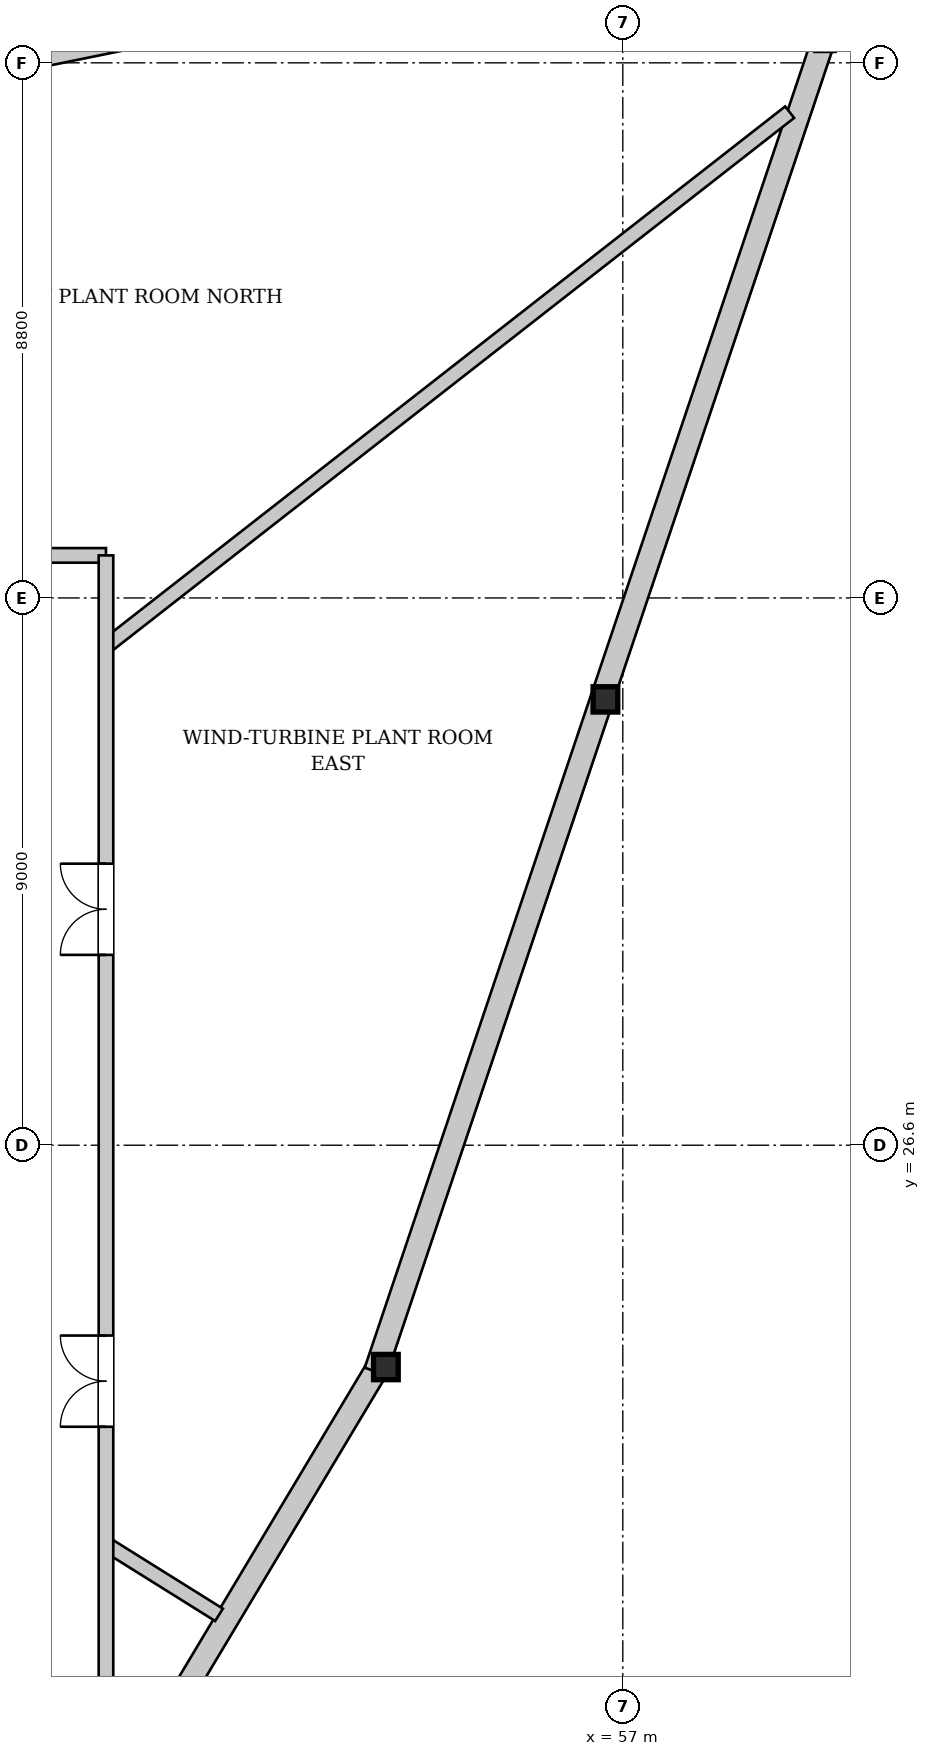
"""IFC4 building model, lengths in metres.
Left out: names, types, materials, properties, quantities, classifications, styles, units other than length and angle.
Written with IfcOpenShell. Run it as: python <this file> out.ifc"""

import sys

from ifc_helpers import new_model, si_unit, direction, frame, frame_2d, origin, origin_2d, place, context, subcontext, project, spatial, rectangle, i_section, extrude, source, transform, mapped, element, fill, save


model = new_model("IFC4")
c1 = context("Model", 3, precision=1e-05, world=origin(), true_north=direction((0.0, 1.0)))
c2 = subcontext(c1, "Body", "Model", "MODEL_VIEW")
j1 = project(units=[si_unit("LENGTHUNIT", "METRE"), si_unit("PLANEANGLEUNIT", "RADIAN")], contexts=[c1])
p1 = place(None, origin())
s1 = spatial("IfcSite", under=j1, at=p1, CompositionType="ELEMENT")
p2 = place(p1, origin())
s2 = spatial("IfcBuilding", under=s1, at=p2, CompositionType="ELEMENT")
p3 = place(p2, frame((0.0, 0.0, 204.3)))
s3 = spatial("IfcBuildingStorey", under=s2, at=p3, CompositionType="ELEMENT", Elevation=204.3)
m1 = source(origin(), c2, "Body", "SweptSolid", [
    extrude(i_section(OverallWidth=0.305, OverallDepth=0.62, WebThickness=0.021, FlangeThickness=0.04, at=origin_2d()), origin(), (0.0, 0.0, 1.0), 5.157),
])
p4 = place(p3, frame((60.492, 44.744, 0.0), z_axis=(-0.064577863285, 0.064956619082, 0.995796333198), x_axis=(-0.709171313301, -0.705036203603, 0.0)))
e1 = element("IfcColumn", 1, at=p4, inside=s3, PredefinedType="COLUMN", context=c2, shape_type="MappedRepresentation", body=[
    mapped(m1, transform((0.0, 0.0, 0.0), x_axis=(1.0, 0.0, 0.0), y_axis=(0.0, 1.0, 0.0), z_axis=(0.0, 0.0, 1.0), scale=1.0)),
])
m2 = source(origin(), c2, "Body", "SweptSolid", [
    extrude(i_section(OverallWidth=0.406, OverallDepth=0.416, WebThickness=0.027, FlangeThickness=0.042, at=origin_2d()), origin(), (0.0, 0.0, 1.0), 5.142),
])
p5 = place(p3, frame((53.115, 22.819, 0.0), z_axis=(-0.004605605152, 0.051611265979, 0.998656630492), x_axis=(-0.996042052378, -0.088883237425, 0.0)))
e2 = element("IfcColumn", 2, at=p5, inside=s3, PredefinedType="COLUMN", context=c2, shape_type="MappedRepresentation", body=[
    mapped(m2, transform((0.0, 0.0, 0.0), x_axis=(1.0, 0.0, 0.0), y_axis=(0.0, 1.0, 0.0), z_axis=(0.0, 0.0, 1.0), scale=1.0)),
])
m3 = source(origin(), c2, "Body", "SweptSolid", [
    extrude(i_section(OverallWidth=0.406, OverallDepth=0.416, WebThickness=0.027, FlangeThickness=0.042, at=origin_2d()), origin(), (0.0, 0.0, 1.0), 5.147),
])
p6 = place(p3, frame((56.803, 33.782, 0.0), z_axis=(-0.034627486329, 0.058297507806, 0.997698520483), x_axis=(-0.859768358952, -0.510684216464, 0.0)))
e3 = element("IfcColumn", 3, at=p6, inside=s3, PredefinedType="COLUMN", context=c2, shape_type="MappedRepresentation", body=[
    mapped(m3, transform((0.0, 0.0, 0.0), x_axis=(1.0, 0.0, 0.0), y_axis=(0.0, 1.0, 0.0), z_axis=(0.0, 0.0, 1.0), scale=1.0)),
])
p7 = place(p3, frame((52.952, 22.917, 0.0), z_axis=(0.0, 0.0, 1.0), x_axis=(-0.51363254846, -0.858010259357, 0.0)))
e4 = element("IfcWall", 4, at=p7, inside=s3, PredefinedType="SOLIDWALL", context=c2, shape_type="SweptSolid", body=[
    extrude(rectangle(XDim=23.133, YDim=0.38, at=frame_2d((11.566, 0.0))), origin(), (0.0, 0.0, 1.0), 4.572),
])
p8 = place(p3, frame((36.438, 42.275, 0.0), z_axis=(0.0, 0.0, 1.0), x_axis=(0.979770307464, 0.200125322264, 0.0)))
e5 = element("IfcWall", 5, at=p8, inside=s3, PredefinedType="SOLIDWALL", context=c2, shape_type="SweptSolid", body=[
    extrude(rectangle(XDim=22.569, YDim=0.38, at=frame_2d((11.284, 0.0))), origin(), (0.0, 0.0, 1.0), 4.572),
])
p9 = place(p3, frame((58.37, 46.852, 0.0), z_axis=(0.0, 0.0, 1.0), x_axis=(0.663286689739, -0.748365396859, 0.0)))
e6 = element("IfcWall", 6, at=p9, inside=s3, PredefinedType="SOLIDWALL", context=c2, shape_type="SweptSolid", body=[
    extrude(rectangle(XDim=2.984, YDim=0.38, at=frame_2d((1.492, 0.0))), origin(), (0.0, 0.0, 1.0), 4.572),
])
p10 = place(p3, frame((60.312, 44.805, 0.0), z_axis=(0.0, 0.0, 1.0), x_axis=(-0.318870334395, -0.947798348724, 0.0)))
e7 = element("IfcWall", 7, at=p10, inside=s3, PredefinedType="SOLIDWALL", context=c2, shape_type="SweptSolid", body=[
    extrude(rectangle(XDim=23.132, YDim=0.38, at=frame_2d((11.566, 0.0))), origin(), (0.0, 0.0, 1.0), 4.572),
])
p11 = place(p3, frame((48.5, 20.039, 0.0), z_axis=(0.0, 0.0, 1.0), x_axis=(0.848067119761, -0.529888818887, 0.0)))
e8 = element("IfcWall", 8, at=p11, inside=s3, PredefinedType="PARTITIONING", context=c2, shape_type="SweptSolid", body=[
    extrude(rectangle(XDim=2.192, YDim=0.24, at=frame_2d((1.096, 0.0))), origin(), (0.0, 0.0, 1.0), 5.08),
])
p12 = place(p3, frame((48.5, 34.803, 0.0), z_axis=(0.0, 0.0, 1.0), x_axis=(0.788009847279, 0.615662635371, 0.0)))
e9 = element("IfcWall", 9, at=p12, inside=s3, PredefinedType="PARTITIONING", context=c2, shape_type="SweptSolid", body=[
    extrude(rectangle(XDim=14.269, YDim=0.24, at=frame_2d((7.135, 0.0))), origin(), (0.0, 0.0, 1.0), 5.08),
])
p13 = place(p3, frame((27.5, 36.3, 0.0), z_axis=(0.0, 0.0, 1.0), x_axis=(1.0, 0.0, 0.0)))
e10 = element("IfcWall", 10, at=p13, inside=s3, PredefinedType="PARTITIONING", context=c2, shape_type="SweptSolid", body=[
    extrude(rectangle(XDim=21.0, YDim=0.24, at=frame_2d((10.5, 0.0))), origin(), (0.0, 0.0, 1.0), 5.08),
])
p14 = place(p13, frame((4.75, 0.0, 0.0)))
e11 = element("IfcOpeningElement", 11, at=p14, cuts=e10, PredefinedType="OPENING", context=c2, shape_type="SweptSolid", body=[
    extrude(rectangle(XDim=1.5, YDim=2.25, at=frame_2d((0.75, 1.125))), frame((0.0, 0.13, 0.0), z_axis=(0.0, -1.0, 0.0), x_axis=(1.0, 0.0, 0.0)), (0.0, 0.0, 1.0), 0.26),
])
p15 = place(p13, frame((13.95, 0.0, 0.0)))
e12 = element("IfcOpeningElement", 12, at=p15, cuts=e10, PredefinedType="OPENING", context=c2, shape_type="SweptSolid", body=[
    extrude(rectangle(XDim=1.5, YDim=2.25, at=frame_2d((0.75, 1.125))), frame((0.0, 0.13, 0.0), z_axis=(0.0, -1.0, 0.0), x_axis=(1.0, 0.0, 0.0)), (0.0, 0.0, 1.0), 0.26),
])
p16 = place(p3, frame((48.5, 16.9, 0.0), z_axis=(0.0, 0.0, 1.0), x_axis=(0.0, 1.0, 0.0)))
e13 = element("IfcWall", 13, at=p16, inside=s3, PredefinedType="PARTITIONING", context=c2, shape_type="SweptSolid", body=[
    extrude(rectangle(XDim=19.4, YDim=0.24, at=frame_2d((9.7, 0.0))), origin(), (0.0, 0.0, 1.0), 5.08),
])
p17 = place(p16, frame((5.07, 0.0, 0.0)))
e14 = element("IfcOpeningElement", 14, at=p17, cuts=e13, PredefinedType="OPENING", context=c2, shape_type="SweptSolid", body=[
    extrude(rectangle(XDim=1.5, YDim=2.25, at=frame_2d((0.75, 1.125))), frame((0.0, 0.13, 0.0), z_axis=(0.0, -1.0, 0.0), x_axis=(1.0, 0.0, 0.0)), (0.0, 0.0, 1.0), 0.26),
])
p18 = place(p16, frame((12.83, 0.0, 0.0)))
e15 = element("IfcOpeningElement", 15, at=p18, cuts=e13, PredefinedType="OPENING", context=c2, shape_type="SweptSolid", body=[
    extrude(rectangle(XDim=1.5, YDim=2.25, at=frame_2d((0.75, 1.125))), frame((0.0, 0.13, 0.0), z_axis=(0.0, -1.0, 0.0), x_axis=(1.0, 0.0, 0.0)), (0.0, 0.0, 1.0), 0.26),
])
m4 = source(origin(), c2, "Body", "SweptSolid", [
    extrude(rectangle(XDim=1.5, YDim=2.25, at=frame_2d((0.75, 1.125))), frame((0.0, 0.025, 0.0), z_axis=(0.0, -1.0, 0.0), x_axis=(1.0, 0.0, 0.0)), (0.0, 0.0, 1.0), 0.05),
])
p19 = place(p17, origin())
e16 = element("IfcDoor", 16, at=p19, inside=s3, OperationType="DOUBLE_DOOR_SINGLE_SWING", PredefinedType="DOOR", context=c2, shape_type="MappedRepresentation", body=[
    mapped(m4, transform((0.0, 0.0, 0.0), x_axis=(1.0, 0.0, 0.0), y_axis=(0.0, 1.0, 0.0), z_axis=(0.0, 0.0, 1.0), scale=1.0)),
])
fill(e14, e16)
p20 = place(p18, origin())
e17 = element("IfcDoor", 17, at=p20, inside=s3, OperationType="DOUBLE_DOOR_SINGLE_SWING", PredefinedType="DOOR", context=c2, shape_type="MappedRepresentation", body=[
    mapped(m4, transform((0.0, 0.0, 0.0), x_axis=(1.0, 0.0, 0.0), y_axis=(0.0, 1.0, 0.0), z_axis=(0.0, 0.0, 1.0), scale=1.0)),
])
fill(e15, e17)
save(model, sys.argv[1])
